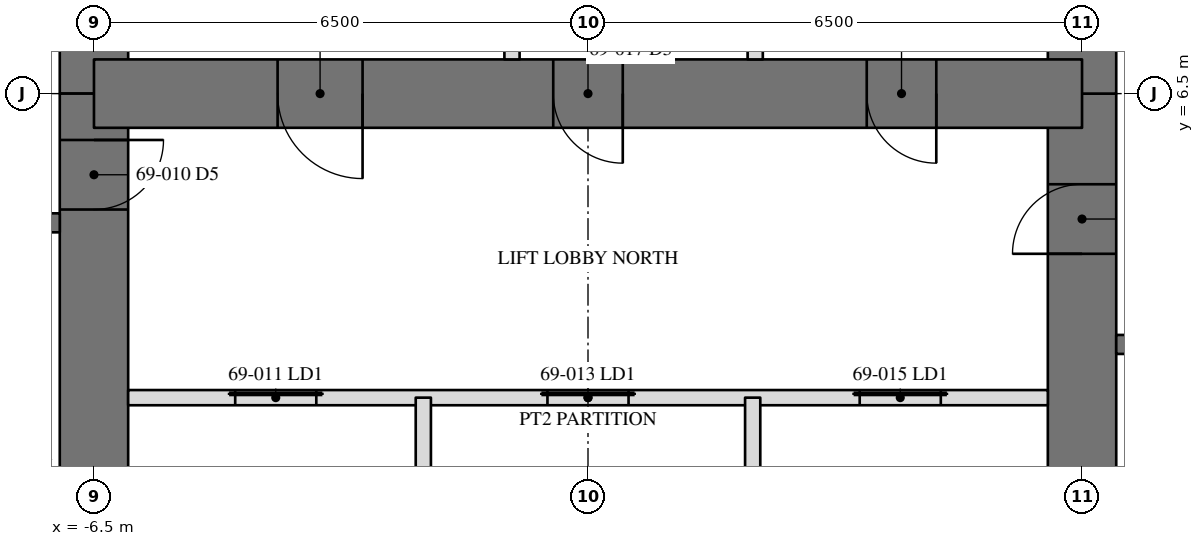
"""IFC4 building model, lengths in metres.
Left out: names, types, materials, properties, quantities, classifications, styles, units other than length and angle.
Written with IfcOpenShell. Run it as: python <this file> out.ifc"""

import sys

from ifc_helpers import new_model, si_unit, direction, frame, frame_2d, origin, place, context, subcontext, project, spatial, rectangle, extrude, element, fill, save


model = new_model("IFC4")
c1 = context("Model", 3, precision=1e-05, world=origin(), true_north=direction((0.0, 1.0)))
c2 = subcontext(c1, "Body", "Model", "MODEL_VIEW")
j1 = project(units=[si_unit("LENGTHUNIT", "METRE"), si_unit("PLANEANGLEUNIT", "RADIAN")], contexts=[c1])
p1 = place(None, origin())
s1 = spatial("IfcSite", under=j1, at=p1, CompositionType="ELEMENT")
p2 = place(p1, origin())
s2 = spatial("IfcBuilding", under=s1, at=p2, CompositionType="ELEMENT")
p3 = place(p2, frame((0.0, 0.0, 281.2)))
s3 = spatial("IfcBuildingStorey", under=s2, at=p3, CompositionType="ELEMENT", Elevation=281.2)
p4 = place(p3, frame((6.5, -6.5, 0.0), z_axis=(0.0, 0.0, 1.0), x_axis=(0.0, 1.0, 0.0)))
e1 = element("IfcWall", 1, at=p4, inside=s3, PredefinedType="SHEAR", context=c2, shape_type="SweptSolid", body=[
    extrude(rectangle(XDim=13.0, YDim=0.9, at=frame_2d((6.5, 0.0))), origin(), (0.0, 0.0, 1.0), 3.6),
])
p5 = place(p4, frame((10.893, 0.0, 0.0)))
e2 = element("IfcOpeningElement", 2, at=p5, cuts=e1, PredefinedType="OPENING", context=c2, shape_type="SweptSolid", body=[
    extrude(rectangle(XDim=0.915, YDim=2.134, at=frame_2d((0.458, 1.067))), frame((0.0, 0.46, 0.0), z_axis=(0.0, -1.0, 0.0), x_axis=(1.0, 0.0, 0.0)), (0.0, 0.0, 1.0), 0.92),
])
p6 = place(p4, frame((0.61, 0.0, 0.0)))
e3 = element("IfcOpeningElement", 3, at=p6, cuts=e1, PredefinedType="OPENING", context=c2, shape_type="SweptSolid", body=[
    extrude(rectangle(XDim=0.915, YDim=2.134, at=frame_2d((0.458, 1.067))), frame((0.0, 0.46, 0.0), z_axis=(0.0, -1.0, 0.0), x_axis=(1.0, 0.0, 0.0)), (0.0, 0.0, 1.0), 0.92),
])
for number, where, z_axis, x_axis in (
    (4, (6.5, 6.5, 0.0), (0.0, 0.0, 1.0), (0.0, 1.0, 0.0)),
    (5, (-6.5, 11.0, 0.0), (0.0, 0.0, 1.0), (0.0, -1.0, 0.0)),
):
    element("IfcWall", number, at=place(p3, frame(where, z_axis=z_axis, x_axis=x_axis)), inside=s3, PredefinedType="SHEAR", context=c2, shape_type="SweptSolid", body=[
        extrude(rectangle(XDim=4.5, YDim=0.9, at=frame_2d((2.25, 0.0))), origin(), (0.0, 0.0, 1.0), 3.6),
    ])
p7 = place(p3, frame((-6.5, 6.5, 0.0), z_axis=(0.0, 0.0, 1.0), x_axis=(0.0, -1.0, 0.0)))
e6 = element("IfcWall", 6, at=p7, inside=s3, PredefinedType="SHEAR", context=c2, shape_type="SweptSolid", body=[
    extrude(rectangle(XDim=13.0, YDim=0.9, at=frame_2d((6.5, 0.0))), origin(), (0.0, 0.0, 1.0), 3.6),
])
p8 = place(p7, frame((10.893, 0.0, 0.0)))
e7 = element("IfcOpeningElement", 7, at=p8, cuts=e6, PredefinedType="OPENING", context=c2, shape_type="SweptSolid", body=[
    extrude(rectangle(XDim=0.915, YDim=2.134, at=frame_2d((0.458, 1.067))), frame((0.0, 0.46, 0.0), z_axis=(0.0, -1.0, 0.0), x_axis=(1.0, 0.0, 0.0)), (0.0, 0.0, 1.0), 0.92),
])
p9 = place(p7, frame((0.61, 0.0, 0.0)))
e8 = element("IfcOpeningElement", 8, at=p9, cuts=e6, PredefinedType="OPENING", context=c2, shape_type="SweptSolid", body=[
    extrude(rectangle(XDim=0.915, YDim=2.134, at=frame_2d((0.458, 1.067))), frame((0.0, 0.46, 0.0), z_axis=(0.0, -1.0, 0.0), x_axis=(1.0, 0.0, 0.0)), (0.0, 0.0, 1.0), 0.92),
])
p10 = place(p3, frame((6.5, 6.5, 0.0), z_axis=(0.0, 0.0, 1.0), x_axis=(-1.0, 0.0, 0.0)))
e9 = element("IfcWall", 9, at=p10, inside=s3, PredefinedType="SHEAR", context=c2, shape_type="SweptSolid", body=[
    extrude(rectangle(XDim=13.0, YDim=0.9, at=frame_2d((6.5, 0.0))), origin(), (0.0, 0.0, 1.0), 3.6),
])
p11 = place(p10, frame((6.042, 0.0, 0.0)))
e10 = element("IfcOpeningElement", 10, at=p11, cuts=e9, PredefinedType="OPENING", context=c2, shape_type="SweptSolid", body=[
    extrude(rectangle(XDim=0.915, YDim=2.134, at=frame_2d((0.458, 1.067))), frame((0.0, 0.46, 0.0), z_axis=(0.0, -1.0, 0.0), x_axis=(1.0, 0.0, 0.0)), (0.0, 0.0, 1.0), 0.92),
])
p12 = place(p10, frame((9.466, 0.0, 0.0)))
e11 = element("IfcOpeningElement", 11, at=p12, cuts=e9, PredefinedType="OPENING", context=c2, shape_type="SweptSolid", body=[
    extrude(rectangle(XDim=1.118, YDim=2.134, at=frame_2d((0.559, 1.067))), frame((0.0, 0.46, 0.0), z_axis=(0.0, -1.0, 0.0), x_axis=(1.0, 0.0, 0.0)), (0.0, 0.0, 1.0), 0.92),
])
p13 = place(p10, frame((1.917, 0.0, 0.0)))
e12 = element("IfcOpeningElement", 12, at=p13, cuts=e9, PredefinedType="OPENING", context=c2, shape_type="SweptSolid", body=[
    extrude(rectangle(XDim=0.915, YDim=2.134, at=frame_2d((0.458, 1.067))), frame((0.0, 0.46, 0.0), z_axis=(0.0, -1.0, 0.0), x_axis=(1.0, 0.0, 0.0)), (0.0, 0.0, 1.0), 0.92),
])
p14 = place(p3, frame((-6.95, 4.8, 0.0), z_axis=(0.0, 0.0, 1.0), x_axis=(-1.0, 0.0, 0.0)))
e13 = element("IfcWall", 13, at=p14, inside=s3, PredefinedType="SOLIDWALL", context=c2, shape_type="SweptSolid", body=[
    extrude(rectangle(XDim=3.75, YDim=0.25, at=frame_2d((1.875, 0.0))), origin(), (0.0, 0.0, 1.0), 3.41),
])
p15 = place(p3, frame((6.95, 3.2, 0.0), z_axis=(0.0, 0.0, 1.0), x_axis=(1.0, 0.0, 0.0)))
e14 = element("IfcWall", 14, at=p15, inside=s3, PredefinedType="SOLIDWALL", context=c2, shape_type="SweptSolid", body=[
    extrude(rectangle(XDim=3.75, YDim=0.25, at=frame_2d((1.875, 0.0))), origin(), (0.0, 0.0, 1.0), 3.41),
])
p16 = place(p15, frame((1.342, 0.0, 0.0)))
e15 = element("IfcOpeningElement", 15, at=p16, cuts=e14, PredefinedType="OPENING", context=c2, shape_type="SweptSolid", body=[
    extrude(rectangle(XDim=1.067, YDim=2.134, at=frame_2d((0.533, 1.067))), frame((0.0, 0.135, 0.0), z_axis=(0.0, -1.0, 0.0), x_axis=(1.0, 0.0, 0.0)), (0.0, 0.0, 1.0), 0.27),
])
p17 = place(p3, frame((-6.05, 2.5, 0.0), z_axis=(0.0, 0.0, 1.0), x_axis=(1.0, 0.0, 0.0)))
e16 = element("IfcWall", 16, at=p17, inside=s3, PredefinedType="PARTITIONING", context=c2, shape_type="SweptSolid", body=[
    extrude(rectangle(XDim=12.1, YDim=0.2, at=frame_2d((6.05, 0.0))), origin(), (0.0, 0.0, 1.0), 3.41),
])
p18 = place(p17, frame((1.408, 0.0, 0.0)))
e17 = element("IfcOpeningElement", 17, at=p18, cuts=e16, PredefinedType="OPENING", context=c2, shape_type="SweptSolid", body=[
    extrude(rectangle(XDim=1.067, YDim=2.134, at=frame_2d((0.533, 1.067))), frame((0.0, 0.11, 0.0), z_axis=(0.0, -1.0, 0.0), x_axis=(1.0, 0.0, 0.0)), (0.0, 0.0, 1.0), 0.22),
])
p19 = place(p17, frame((5.517, 0.0, 0.0)))
e18 = element("IfcOpeningElement", 18, at=p19, cuts=e16, PredefinedType="OPENING", context=c2, shape_type="SweptSolid", body=[
    extrude(rectangle(XDim=1.067, YDim=2.134, at=frame_2d((0.533, 1.067))), frame((0.0, 0.11, 0.0), z_axis=(0.0, -1.0, 0.0), x_axis=(1.0, 0.0, 0.0)), (0.0, 0.0, 1.0), 0.22),
])
p20 = place(p17, frame((9.625, 0.0, 0.0)))
e19 = element("IfcOpeningElement", 19, at=p20, cuts=e16, PredefinedType="OPENING", context=c2, shape_type="SweptSolid", body=[
    extrude(rectangle(XDim=1.067, YDim=2.134, at=frame_2d((0.533, 1.067))), frame((0.0, 0.11, 0.0), z_axis=(0.0, -1.0, 0.0), x_axis=(1.0, 0.0, 0.0)), (0.0, 0.0, 1.0), 0.22),
])
for number, where, z_axis, x_axis in (
    (20, (-2.167, -2.5, 0.0), (0.0, 0.0, 1.0), (0.0, 1.0, 0.0)),
    (21, (2.167, -2.5, 0.0), (0.0, 0.0, 1.0), (0.0, 1.0, 0.0)),
):
    element("IfcWall", number, at=place(p3, frame(where, z_axis=z_axis, x_axis=x_axis)), inside=s3, PredefinedType="PARTITIONING", context=c2, shape_type="SweptSolid", body=[
        extrude(rectangle(XDim=5.0, YDim=0.2, at=frame_2d((2.5, 0.0))), origin(), (0.0, 0.0, 1.0), 3.41),
    ])
for number, where, z_axis, x_axis in (
    (22, (-1.0, 6.95, 0.0), (0.0, 0.0, 1.0), (0.0, 1.0, 0.0)),
    (23, (2.2, 6.95, 0.0), (0.0, 0.0, 1.0), (0.0, 1.0, 0.0)),
):
    element("IfcWall", number, at=place(p3, frame(where, z_axis=z_axis, x_axis=x_axis)), inside=s3, PredefinedType="PARTITIONING", context=c2, shape_type="SweptSolid", body=[
        extrude(rectangle(XDim=3.75, YDim=0.2, at=frame_2d((1.875, 0.0))), origin(), (0.0, 0.0, 1.0), 3.41),
    ])
p21 = place(p5, origin())
e24 = element("IfcDoor", 24, at=p21, inside=s3, OperationType="SINGLE_SWING_RIGHT", PredefinedType="DOOR", context=c2, shape_type="SweptSolid", body=[
    extrude(rectangle(XDim=0.915, YDim=2.134, at=frame_2d((0.458, 1.067))), frame((0.0, -0.375, 0.0), z_axis=(0.0, -1.0, 0.0), x_axis=(1.0, 0.0, 0.0)), (0.0, 0.0, 1.0), 0.05),
])
fill(e2, e24)
p22 = place(p9, origin())
e25 = element("IfcDoor", 25, at=p22, inside=s3, OperationType="SINGLE_SWING_RIGHT", PredefinedType="DOOR", context=c2, shape_type="SweptSolid", body=[
    extrude(rectangle(XDim=0.915, YDim=2.134, at=frame_2d((0.458, 1.067))), frame((0.0, -0.375, 0.0), z_axis=(0.0, -1.0, 0.0), x_axis=(1.0, 0.0, 0.0)), (0.0, 0.0, 1.0), 0.05),
])
fill(e8, e25)
p23 = place(p18, origin())
e26 = element("IfcDoor", 26, at=p23, inside=s3, OperationType="SLIDING_TO_LEFT", PredefinedType="DOOR", context=c2, shape_type="SweptSolid", body=[
    extrude(rectangle(XDim=1.067, YDim=2.134, at=frame_2d((0.533, 1.067))), frame((0.0, 0.025, 0.0), z_axis=(0.0, -1.0, 0.0), x_axis=(1.0, 0.0, 0.0)), (0.0, 0.0, 1.0), 0.05),
])
fill(e17, e26)
p24 = place(p19, origin())
e27 = element("IfcDoor", 27, at=p24, inside=s3, OperationType="SLIDING_TO_LEFT", PredefinedType="DOOR", context=c2, shape_type="SweptSolid", body=[
    extrude(rectangle(XDim=1.067, YDim=2.134, at=frame_2d((0.533, 1.067))), frame((0.0, 0.025, 0.0), z_axis=(0.0, -1.0, 0.0), x_axis=(1.0, 0.0, 0.0)), (0.0, 0.0, 1.0), 0.05),
])
fill(e18, e27)
p25 = place(p20, origin())
e28 = element("IfcDoor", 28, at=p25, inside=s3, OperationType="SLIDING_TO_LEFT", PredefinedType="DOOR", context=c2, shape_type="SweptSolid", body=[
    extrude(rectangle(XDim=1.067, YDim=2.134, at=frame_2d((0.533, 1.067))), frame((0.0, 0.025, 0.0), z_axis=(0.0, -1.0, 0.0), x_axis=(1.0, 0.0, 0.0)), (0.0, 0.0, 1.0), 0.05),
])
fill(e19, e28)
p26 = place(p11, origin())
e29 = element("IfcDoor", 29, at=p26, inside=s3, OperationType="SINGLE_SWING_RIGHT", PredefinedType="DOOR", context=c2, shape_type="SweptSolid", body=[
    extrude(rectangle(XDim=0.915, YDim=2.134, at=frame_2d((0.458, 1.067))), frame((0.0, -0.375, 0.0), z_axis=(0.0, -1.0, 0.0), x_axis=(1.0, 0.0, 0.0)), (0.0, 0.0, 1.0), 0.05),
])
fill(e10, e29)
p27 = place(p12, origin())
e30 = element("IfcDoor", 30, at=p27, inside=s3, OperationType="SINGLE_SWING_RIGHT", PredefinedType="DOOR", context=c2, shape_type="SweptSolid", body=[
    extrude(rectangle(XDim=1.118, YDim=2.134, at=frame_2d((0.559, 1.067))), frame((0.0, -0.375, 0.0), z_axis=(0.0, -1.0, 0.0), x_axis=(1.0, 0.0, 0.0)), (0.0, 0.0, 1.0), 0.05),
])
fill(e11, e30)
p28 = place(p13, origin())
e31 = element("IfcDoor", 31, at=p28, inside=s3, OperationType="SINGLE_SWING_RIGHT", PredefinedType="DOOR", context=c2, shape_type="SweptSolid", body=[
    extrude(rectangle(XDim=0.915, YDim=2.134, at=frame_2d((0.458, 1.067))), frame((0.0, -0.375, 0.0), z_axis=(0.0, -1.0, 0.0), x_axis=(1.0, 0.0, 0.0)), (0.0, 0.0, 1.0), 0.05),
])
fill(e12, e31)
save(model, sys.argv[1])
